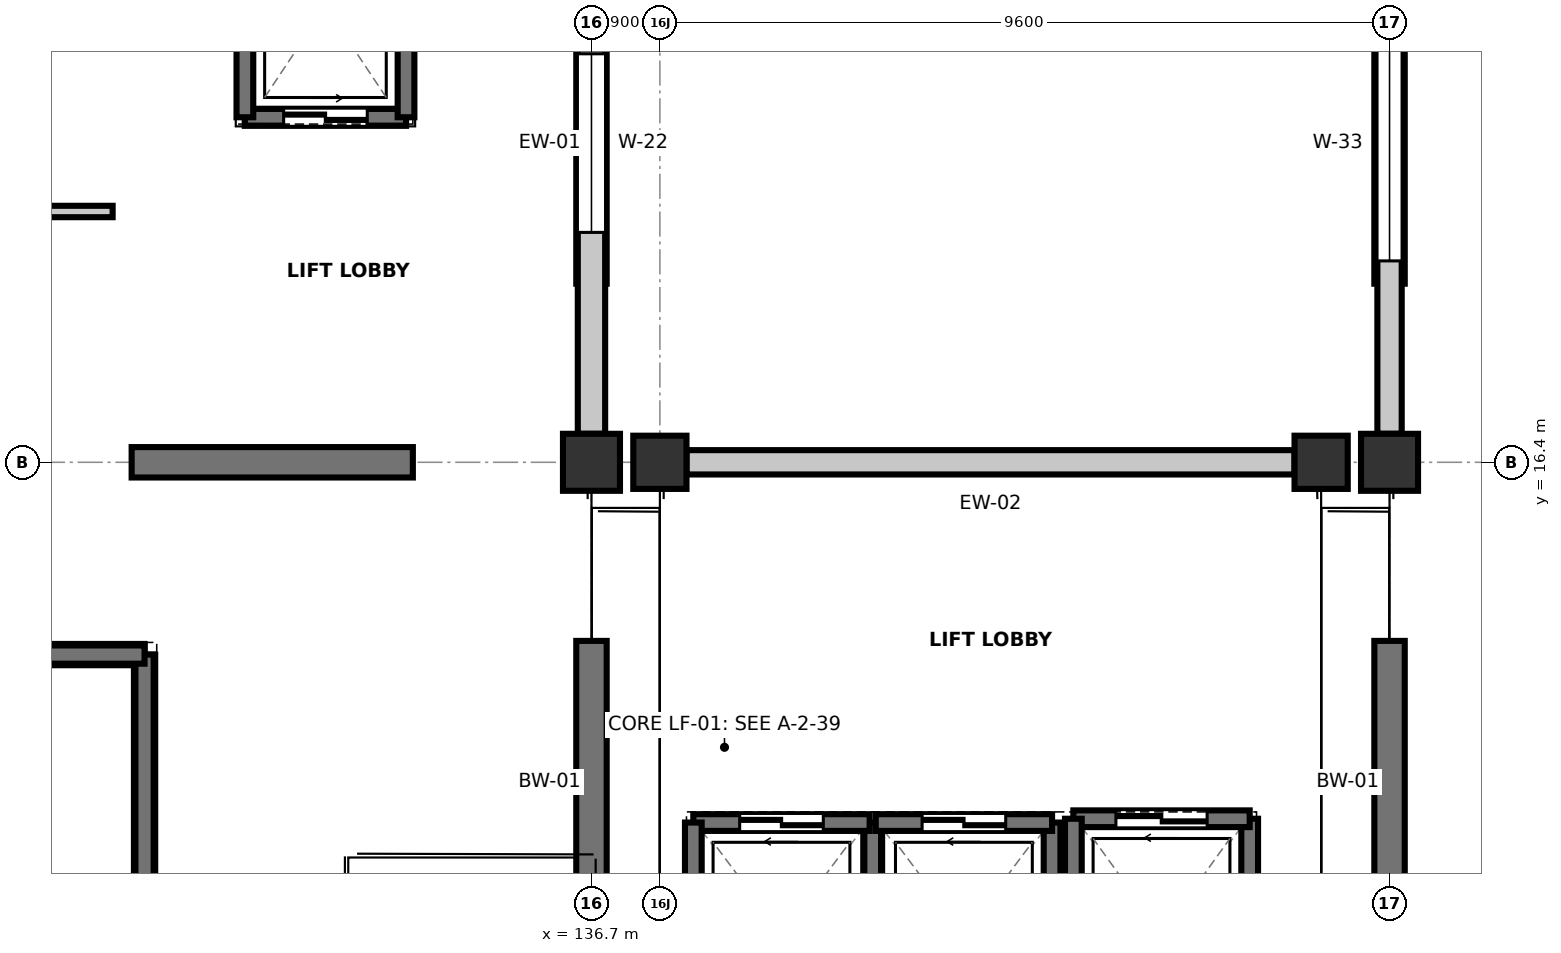
"""IFC4 building model, lengths in metres.
Left out: names, types, materials, properties, quantities, classifications, styles, units other than length and angle.
Written with IfcOpenShell. Run it as: python <this file> out.ifc"""

import sys

from ifc_helpers import new_model, si_unit, direction, frame, frame_2d, origin, origin_2d, place, context, subcontext, project, spatial, rectangle, extrude, element, fill, save


model = new_model("IFC4")
c1 = context("Model", 3, precision=1e-05, world=origin(), true_north=direction((0.0, 1.0)))
c2 = subcontext(c1, "Body", "Model", "MODEL_VIEW")
j1 = project(units=[si_unit("LENGTHUNIT", "METRE"), si_unit("PLANEANGLEUNIT", "RADIAN")], contexts=[c1])
p1 = place(None, origin())
s1 = spatial("IfcSite", under=j1, at=p1, CompositionType="ELEMENT")
p2 = place(p1, origin())
s2 = spatial("IfcBuilding", under=s1, at=p2, CompositionType="ELEMENT")
p3 = place(p2, frame((0.0, 0.0, 4.8)))
s3 = spatial("IfcBuildingStorey", under=s2, at=p3, CompositionType="ELEMENT", Elevation=4.8)
p4 = place(p3, frame((136.7, 16.4, 0.0), z_axis=(0.0, 0.0, 1.0), x_axis=(1.0, 0.0, 0.0)))
e1 = element("IfcColumn", 1, at=p4, inside=s3, PredefinedType="COLUMN", context=c2, shape_type="SweptSolid", body=[
    extrude(rectangle(XDim=0.75, YDim=0.75, at=origin_2d()), origin(), (0.0, 0.0, 1.0), 4.8),
])
p5 = place(p3, frame((130.65, 16.4, -2.1), z_axis=(0.0, 0.0, 1.0), x_axis=(1.0, 0.0, 0.0)))
e2 = element("IfcWall", 2, at=p5, inside=s3, PredefinedType="SOLIDWALL", context=c2, shape_type="SweptSolid", body=[
    extrude(rectangle(XDim=3.7, YDim=0.4, at=frame_2d((1.85, 0.0))), origin(), (0.0, 0.0, 1.0), 1.85),
])
for number, where, z_axis, x_axis in (
    (3, (136.7, 10.35, -2.1), (0.0, 0.0, 1.0), (0.0, 1.0, 0.0)),
    (4, (136.7, 18.75, -2.1), (0.0, 0.0, 1.0), (0.0, 1.0, 0.0)),
):
    element("IfcWall", number, at=place(p3, frame(where, z_axis=z_axis, x_axis=x_axis)), inside=s3, PredefinedType="SOLIDWALL", context=c2, shape_type="SweptSolid", body=[
        extrude(rectangle(XDim=3.7, YDim=0.4, at=frame_2d((1.85, 0.0))), origin(), (0.0, 0.0, 1.0), 1.85),
    ])
for number, where, z_axis, x_axis in (
    (5, (137.6, 16.4, 0.0), (0.0, 0.0, 1.0), (1.0, 0.0, 0.0)),
    (6, (146.3, 16.4, 0.0), (0.0, 0.0, 1.0), (1.0, 0.0, 0.0)),
):
    element("IfcColumn", number, at=place(p3, frame(where, z_axis=z_axis, x_axis=x_axis)), inside=s3, PredefinedType="COLUMN", context=c2, shape_type="SweptSolid", body=[
        extrude(rectangle(XDim=0.7, YDim=0.7, at=origin_2d()), origin(), (0.0, 0.0, 1.0), 4.8),
    ])
p6 = place(p3, frame((147.2, 16.4, 0.0), z_axis=(0.0, 0.0, 1.0), x_axis=(1.0, 0.0, 0.0)))
e7 = element("IfcColumn", 7, at=p6, inside=s3, PredefinedType="COLUMN", context=c2, shape_type="SweptSolid", body=[
    extrude(rectangle(XDim=0.75, YDim=0.75, at=origin_2d()), origin(), (0.0, 0.0, 1.0), 4.8),
])
for number, where, z_axis, x_axis in (
    (8, (147.2, 10.35, -2.1), (0.0, 0.0, 1.0), (0.0, 1.0, 0.0)),
    (9, (147.2, 18.75, -2.1), (0.0, 0.0, 1.0), (0.0, 1.0, 0.0)),
):
    element("IfcWall", number, at=place(p3, frame(where, z_axis=z_axis, x_axis=x_axis)), inside=s3, PredefinedType="SOLIDWALL", context=c2, shape_type="SweptSolid", body=[
        extrude(rectangle(XDim=3.7, YDim=0.4, at=frame_2d((1.85, 0.0))), origin(), (0.0, 0.0, 1.0), 1.85),
    ])
p7 = place(p3, frame((130.82, 9.68, -2.1), z_axis=(0.0, 0.0, 1.0), x_axis=(0.0, 1.0, 0.0)))
e10 = element("IfcWall", 10, at=p7, inside=s3, PredefinedType="SOLIDWALL", context=c2, shape_type="SweptSolid", body=[
    extrude(rectangle(XDim=4.19, YDim=0.28, at=frame_2d((2.095, 0.0))), origin(), (0.0, 0.0, 1.0), 1.8),
])
p8 = place(p3, frame((130.82, 13.87, -2.1), z_axis=(0.0, 0.0, 1.0), x_axis=(-1.0, 0.0, 0.0)))
e11 = element("IfcWall", 11, at=p8, inside=s3, PredefinedType="SOLIDWALL", context=c2, shape_type="SweptSolid", body=[
    extrude(rectangle(XDim=8.54, YDim=0.28, at=frame_2d((4.27, 0.0))), origin(), (0.0, 0.0, 1.0), 1.8),
])
p9 = place(p3, frame((136.7, 16.775, 0.0), z_axis=(0.0, 0.0, 1.0), x_axis=(0.0, 1.0, 0.0)))
e12 = element("IfcWall", 12, at=p9, inside=s3, PredefinedType="STANDARD", context=c2, shape_type="SweptSolid", body=[
    extrude(rectangle(XDim=7.65, YDim=0.36, at=frame_2d((3.825, 0.0))), origin(), (0.0, 0.0, 1.0), 3.685),
])
p10 = place(p9, frame((2.65, 0.0, 0.95)))
e13 = element("IfcOpeningElement", 13, at=p10, cuts=e12, PredefinedType="OPENING", context=c2, shape_type="SweptSolid", body=[
    extrude(rectangle(XDim=2.35, YDim=1.7, at=frame_2d((1.175, 0.85))), frame((0.0, 0.19, 0.0), z_axis=(0.0, -1.0, 0.0), x_axis=(1.0, 0.0, 0.0)), (0.0, 0.0, 1.0), 0.38),
])
p11 = place(p3, frame((145.95, 16.4, 0.0), z_axis=(0.0, 0.0, 1.0), x_axis=(-1.0, 0.0, 0.0)))
e14 = element("IfcWall", 14, at=p11, inside=s3, PredefinedType="STANDARD", context=c2, shape_type="SweptSolid", body=[
    extrude(rectangle(XDim=8.0, YDim=0.32, at=frame_2d((4.0, 0.0))), origin(), (0.0, 0.0, 1.0), 3.785),
])
p12 = place(p3, frame((147.2, 24.425, 0.0), z_axis=(0.0, 0.0, 1.0), x_axis=(0.0, -1.0, 0.0)))
e15 = element("IfcWall", 15, at=p12, inside=s3, PredefinedType="STANDARD", context=c2, shape_type="SweptSolid", body=[
    extrude(rectangle(XDim=7.65, YDim=0.32, at=frame_2d((3.825, 0.0))), origin(), (0.0, 0.0, 1.0), 4.145),
])
p13 = place(p12, frame((2.275, 0.0, 0.95)))
e16 = element("IfcOpeningElement", 16, at=p13, cuts=e15, PredefinedType="OPENING", context=c2, shape_type="SweptSolid", body=[
    extrude(rectangle(XDim=3.1, YDim=1.45, at=frame_2d((1.55, 0.725))), frame((0.0, 0.17, 0.0), z_axis=(0.0, -1.0, 0.0), x_axis=(1.0, 0.0, 0.0)), (0.0, 0.0, 1.0), 0.34),
])
p14 = place(p3, frame((130.82, 9.68, 0.0), z_axis=(0.0, 0.0, 1.0), x_axis=(0.0, 1.0, 0.0)))
e17 = element("IfcWall", 17, at=p14, inside=s3, PredefinedType="SHEAR", context=c2, shape_type="SweptSolid", body=[
    extrude(rectangle(XDim=4.19, YDim=0.24, at=frame_2d((2.095, 0.0))), origin(), (0.0, 0.0, 1.0), 4.55),
])
p15 = place(p3, frame((130.82, 13.87, 0.0), z_axis=(0.0, 0.0, 1.0), x_axis=(-1.0, 0.0, 0.0)))
e18 = element("IfcWall", 18, at=p15, inside=s3, PredefinedType="SHEAR", context=c2, shape_type="SweptSolid", body=[
    extrude(rectangle(XDim=8.54, YDim=0.24, at=frame_2d((4.27, 0.0))), origin(), (0.0, 0.0, 1.0), 4.55),
])
p16 = place(p3, frame((140.4, 8.74, 0.0), z_axis=(0.0, 0.0, 1.0), x_axis=(0.0, 1.0, 0.0)))
e19 = element("IfcWall", 19, at=p16, inside=s3, PredefinedType="SHEAR", context=c2, shape_type="SweptSolid", body=[
    extrude(rectangle(XDim=2.92, YDim=0.22, at=frame_2d((1.46, 0.0))), origin(), (0.0, 0.0, 1.0), 4.55),
])
p17 = place(p3, frame((140.36, 11.66, 0.0), z_axis=(0.0, 0.0, 1.0), x_axis=(-1.0, 0.0, 0.0)))
e20 = element("IfcWall", 20, at=p17, inside=s3, PredefinedType="SHEAR", context=c2, shape_type="SweptSolid", body=[
    extrude(rectangle(XDim=2.32, YDim=0.22, at=frame_2d((1.16, 0.0))), origin(), (0.0, 0.0, 1.0), 4.55),
])
p18 = place(p17, frame((0.61, 0.0, 0.0)))
e21 = element("IfcOpeningElement", 21, at=p18, cuts=e20, PredefinedType="OPENING", context=c2, shape_type="SweptSolid", body=[
    extrude(rectangle(XDim=1.1, YDim=2.15, at=frame_2d((0.55, 1.075))), frame((0.0, 0.12, 0.0), z_axis=(0.0, -1.0, 0.0), x_axis=(1.0, 0.0, 0.0)), (0.0, 0.0, 1.0), 0.24),
])
for number, where, z_axis, x_axis in (
    (22, (138.04, 11.66, 0.0), (0.0, 0.0, 1.0), (0.0, -1.0, 0.0)),
    (23, (142.76, 8.74, 0.0), (0.0, 0.0, 1.0), (0.0, 1.0, 0.0)),
):
    element("IfcWall", number, at=place(p3, frame(where, z_axis=z_axis, x_axis=x_axis)), inside=s3, PredefinedType="SHEAR", context=c2, shape_type="SweptSolid", body=[
        extrude(rectangle(XDim=2.92, YDim=0.22, at=frame_2d((1.46, 0.0))), origin(), (0.0, 0.0, 1.0), 4.55),
    ])
p19 = place(p3, frame((142.76, 11.66, 0.0), z_axis=(0.0, 0.0, 1.0), x_axis=(-1.0, 0.0, 0.0)))
e24 = element("IfcWall", 24, at=p19, inside=s3, PredefinedType="SHEAR", context=c2, shape_type="SweptSolid", body=[
    extrude(rectangle(XDim=2.32, YDim=0.22, at=frame_2d((1.16, 0.0))), origin(), (0.0, 0.0, 1.0), 4.55),
])
p20 = place(p19, frame((0.61, 0.0, 0.0)))
e25 = element("IfcOpeningElement", 25, at=p20, cuts=e24, PredefinedType="OPENING", context=c2, shape_type="SweptSolid", body=[
    extrude(rectangle(XDim=1.1, YDim=2.15, at=frame_2d((0.55, 1.075))), frame((0.0, 0.12, 0.0), z_axis=(0.0, -1.0, 0.0), x_axis=(1.0, 0.0, 0.0)), (0.0, 0.0, 1.0), 0.24),
])
p21 = place(p3, frame((132.14, 20.94, -1.4), z_axis=(0.0, 0.0, 1.0), x_axis=(1.0, 0.0, 0.0)))
e26 = element("IfcWall", 26, at=p21, inside=s3, PredefinedType="SHEAR", context=c2, shape_type="SweptSolid", body=[
    extrude(rectangle(XDim=2.12, YDim=0.22, at=frame_2d((1.06, 0.0))), origin(), (0.0, 0.0, 1.0), 1.12),
])
p22 = place(p3, frame((132.14, 20.94, 0.0), z_axis=(0.0, 0.0, 1.0), x_axis=(1.0, 0.0, 0.0)))
e27 = element("IfcWall", 27, at=p22, inside=s3, PredefinedType="SHEAR", context=c2, shape_type="SweptSolid", body=[
    extrude(rectangle(XDim=2.12, YDim=0.22, at=frame_2d((1.06, 0.0))), origin(), (0.0, 0.0, 1.0), 4.55),
])
p23 = place(p22, frame((0.51, 0.0, 0.0)))
e28 = element("IfcOpeningElement", 28, at=p23, cuts=e27, PredefinedType="OPENING", context=c2, shape_type="SweptSolid", body=[
    extrude(rectangle(XDim=1.1, YDim=2.15, at=frame_2d((0.55, 1.075))), frame((0.0, 0.12, 0.0), z_axis=(0.0, -1.0, 0.0), x_axis=(1.0, 0.0, 0.0)), (0.0, 0.0, 1.0), 0.24),
])
for number, where, z_axis, x_axis in (
    (29, (134.26, 20.94, 0.0), (0.0, 0.0, 1.0), (0.0, 1.0, 0.0)),
    (30, (132.14, 23.86, 0.0), (0.0, 0.0, 1.0), (0.0, -1.0, 0.0)),
):
    element("IfcWall", number, at=place(p3, frame(where, z_axis=z_axis, x_axis=x_axis)), inside=s3, PredefinedType="SHEAR", context=c2, shape_type="SweptSolid", body=[
        extrude(rectangle(XDim=2.92, YDim=0.22, at=frame_2d((1.46, 0.0))), origin(), (0.0, 0.0, 1.0), 4.55),
    ])
p24 = place(p3, frame((145.36, 8.69, 0.0), z_axis=(0.0, 0.0, 1.0), x_axis=(0.0, 1.0, 0.0)))
e31 = element("IfcWall", 31, at=p24, inside=s3, PredefinedType="SHEAR", context=c2, shape_type="SweptSolid", body=[
    extrude(rectangle(XDim=3.02, YDim=0.22, at=frame_2d((1.51, 0.0))), origin(), (0.0, 0.0, 1.0), 4.55),
])
p25 = place(p3, frame((145.36, 11.71, 0.0), z_axis=(0.0, 0.0, 1.0), x_axis=(-1.0, 0.0, 0.0)))
e32 = element("IfcWall", 32, at=p25, inside=s3, PredefinedType="SHEAR", context=c2, shape_type="SweptSolid", body=[
    extrude(rectangle(XDim=2.32, YDim=0.22, at=frame_2d((1.16, 0.0))), origin(), (0.0, 0.0, 1.0), 4.55),
])
p26 = place(p25, frame((0.56, 0.0, 0.0)))
e33 = element("IfcOpeningElement", 33, at=p26, cuts=e32, PredefinedType="OPENING", context=c2, shape_type="SweptSolid", body=[
    extrude(rectangle(XDim=1.2, YDim=2.15, at=frame_2d((0.6, 1.075))), frame((0.0, 0.12, 0.0), z_axis=(0.0, -1.0, 0.0), x_axis=(1.0, 0.0, 0.0)), (0.0, 0.0, 1.0), 0.24),
])
p27 = place(p3, frame((143.04, 11.71, 0.0), z_axis=(0.0, 0.0, 1.0), x_axis=(0.0, -1.0, 0.0)))
e34 = element("IfcWall", 34, at=p27, inside=s3, PredefinedType="SHEAR", context=c2, shape_type="SweptSolid", body=[
    extrude(rectangle(XDim=3.02, YDim=0.22, at=frame_2d((1.51, 0.0))), origin(), (0.0, 0.0, 1.0), 4.55),
])
p28 = place(p3, frame((111.8, 19.7, 0.0), z_axis=(0.0, 0.0, 1.0), x_axis=(1.0, 0.0, 0.0)))
e35 = element("IfcWall", 35, at=p28, inside=s3, PredefinedType="PARTITIONING", context=c2, shape_type="SweptSolid", body=[
    extrude(rectangle(XDim=18.6, YDim=0.15, at=frame_2d((9.3, 0.0))), origin(), (0.0, 0.0, 1.0), 3.685),
])
p29 = place(p28, frame((11.75, 0.0, 0.0)))
e36 = element("IfcOpeningElement", 36, at=p29, cuts=e35, PredefinedType="OPENING", context=c2, shape_type="SweptSolid", body=[
    extrude(rectangle(XDim=1.3, YDim=2.18, at=frame_2d((0.65, 1.09))), frame((0.0, 0.085, 0.0), z_axis=(0.0, -1.0, 0.0), x_axis=(1.0, 0.0, 0.0)), (0.0, 0.0, 1.0), 0.17),
])
p30 = place(p10, origin())
e37 = element("IfcWindow", 37, at=p30, inside=s3, PartitioningType="SINGLE_PANEL", PredefinedType="WINDOW", context=c2, shape_type="SweptSolid", body=[
    extrude(rectangle(XDim=2.35, YDim=1.7, at=frame_2d((1.175, 0.85))), frame((0.0, 0.03, 0.0), z_axis=(0.0, -1.0, 0.0), x_axis=(1.0, 0.0, 0.0)), (0.0, 0.0, 1.0), 0.06),
])
fill(e13, e37)
p31 = place(p13, origin())
e38 = element("IfcWindow", 38, at=p31, inside=s3, PartitioningType="SINGLE_PANEL", PredefinedType="WINDOW", context=c2, shape_type="SweptSolid", body=[
    extrude(rectangle(XDim=3.1, YDim=1.45, at=frame_2d((1.55, 0.725))), frame((0.0, 0.03, 0.0), z_axis=(0.0, -1.0, 0.0), x_axis=(1.0, 0.0, 0.0)), (0.0, 0.0, 1.0), 0.06),
])
fill(e16, e38)
p32 = place(p18, origin())
e39 = element("IfcDoor", 39, at=p32, inside=s3, OperationType="DOUBLE_DOOR_SLIDING", PredefinedType="DOOR", context=c2, shape_type="SweptSolid", body=[
    extrude(rectangle(XDim=1.1, YDim=2.15, at=frame_2d((0.55, 1.075))), frame((0.0, 0.025, 0.0), z_axis=(0.0, -1.0, 0.0), x_axis=(1.0, 0.0, 0.0)), (0.0, 0.0, 1.0), 0.05),
])
fill(e21, e39)
p33 = place(p20, origin())
e40 = element("IfcDoor", 40, at=p33, inside=s3, OperationType="DOUBLE_DOOR_SLIDING", PredefinedType="DOOR", context=c2, shape_type="SweptSolid", body=[
    extrude(rectangle(XDim=1.1, YDim=2.15, at=frame_2d((0.55, 1.075))), frame((0.0, 0.025, 0.0), z_axis=(0.0, -1.0, 0.0), x_axis=(1.0, 0.0, 0.0)), (0.0, 0.0, 1.0), 0.05),
])
fill(e25, e40)
p34 = place(p23, origin())
e41 = element("IfcDoor", 41, at=p34, inside=s3, OperationType="DOUBLE_DOOR_SLIDING", PredefinedType="DOOR", context=c2, shape_type="SweptSolid", body=[
    extrude(rectangle(XDim=1.1, YDim=2.15, at=frame_2d((0.55, 1.075))), frame((0.0, 0.025, 0.0), z_axis=(0.0, -1.0, 0.0), x_axis=(1.0, 0.0, 0.0)), (0.0, 0.0, 1.0), 0.05),
])
fill(e28, e41)
p35 = place(p26, origin())
e42 = element("IfcDoor", 42, at=p35, inside=s3, OperationType="DOUBLE_DOOR_SLIDING", PredefinedType="DOOR", context=c2, shape_type="SweptSolid", body=[
    extrude(rectangle(XDim=1.2, YDim=2.15, at=frame_2d((0.6, 1.075))), frame((0.0, 0.025, 0.0), z_axis=(0.0, -1.0, 0.0), x_axis=(1.0, 0.0, 0.0)), (0.0, 0.0, 1.0), 0.05),
])
fill(e33, e42)
save(model, sys.argv[1])
